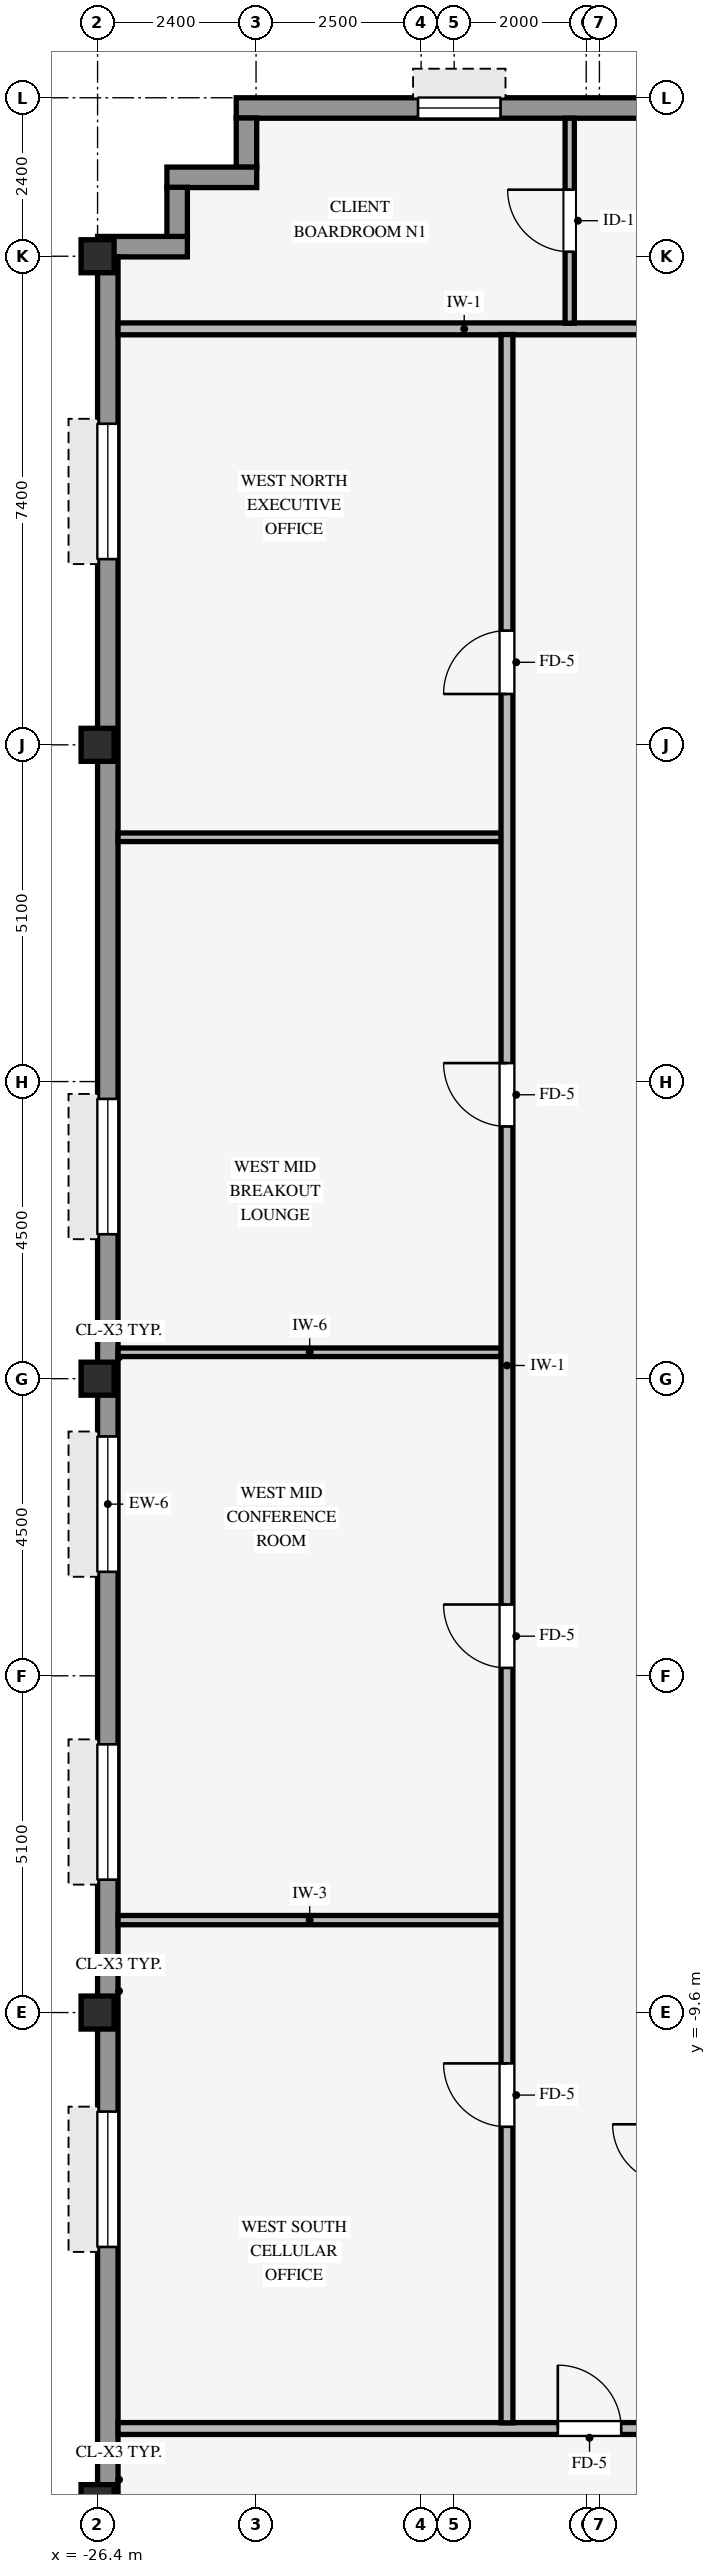
"""IFC4 building model, lengths in metres.
Left out: names, types, materials, properties, quantities, classifications, styles, units other than length and angle.
Written with IfcOpenShell. Run it as: python <this file> out.ifc"""

import sys

from ifc_helpers import new_model, si_unit, direction, frame, frame_2d, origin, origin_2d, place, context, subcontext, project, spatial, rectangle, hollow_rectangle, extrude, source, transform, mapped, element, fill, save


model = new_model("IFC4")
c1 = context("Model", 3, precision=1e-05, world=origin(), true_north=direction((0.0, 1.0)))
c2 = subcontext(c1, "Body", "Model", "MODEL_VIEW")
j1 = project(units=[si_unit("LENGTHUNIT", "METRE"), si_unit("PLANEANGLEUNIT", "RADIAN")], contexts=[c1])
p1 = place(None, origin())
s1 = spatial("IfcSite", under=j1, at=p1, CompositionType="ELEMENT")
p2 = place(p1, origin())
s2 = spatial("IfcBuilding", under=s1, at=p2, CompositionType="ELEMENT")
p3 = place(p2, frame((0.0, 0.0, 201.85)))
s3 = spatial("IfcBuildingStorey", under=s2, at=p3, CompositionType="ELEMENT", Elevation=201.85)
for number, where, z_axis, x_axis in (
    (1, (-26.4, -17.0, 0.0), (0.0, 0.0, 1.0), (1.0, 0.0, 0.0)),
    (2, (-26.4, -9.6, 0.0), (0.0, 0.0, 1.0), (1.0, 0.0, 0.0)),
    (3, (-26.4, 0.0, 0.0), (0.0, 0.0, 1.0), (1.0, 0.0, 0.0)),
    (4, (-26.4, 9.6, 0.0), (0.0, 0.0, 1.0), (1.0, 0.0, 0.0)),
    (5, (-26.4, 17.0, 0.0), (0.0, 0.0, 1.0), (1.0, 0.0, 0.0)),
):
    element("IfcColumn", number, at=place(p3, frame(where, z_axis=z_axis, x_axis=x_axis)), inside=s3, PredefinedType="COLUMN", context=c2, shape_type="SweptSolid", body=[
        extrude(hollow_rectangle(XDim=0.5, YDim=0.5, WallThickness=0.032, InnerFilletRadius=0.032, OuterFilletRadius=0.064, at=origin_2d()), origin(), (0.0, 0.0, 1.0), 3.37),
    ])
p4 = place(p3, frame((-24.3, 19.245, 0.0), z_axis=(0.0, 0.0, 1.0), x_axis=(1.0, 0.0, 0.0)))
e6 = element("IfcWall", 6, at=p4, inside=s3, PredefinedType="STANDARD", context=c2, shape_type="SweptSolid", body=[
    extrude(rectangle(XDim=44.8, YDim=0.31, at=frame_2d((22.4, 0.0))), origin(), (0.0, 0.0, 1.0), 2.705),
])
p5 = place(p4, frame((2.753, 0.0, 0.8)))
e7 = element("IfcOpeningElement", 7, at=p5, cuts=e6, PredefinedType="OPENING", context=c2, shape_type="SweptSolid", body=[
    extrude(rectangle(XDim=1.25, YDim=1.52, at=frame_2d((0.625, 0.76))), frame((0.0, 0.165, 0.0), z_axis=(0.0, -1.0, 0.0), x_axis=(1.0, 0.0, 0.0)), (0.0, 0.0, 1.0), 0.33),
])
p6 = place(p4, frame((7.508, 0.0, 0.8)))
e8 = element("IfcOpeningElement", 8, at=p6, cuts=e6, PredefinedType="OPENING", context=c2, shape_type="SweptSolid", body=[
    extrude(rectangle(XDim=1.25, YDim=1.52, at=frame_2d((0.625, 0.76))), frame((0.0, 0.165, 0.0), z_axis=(0.0, -1.0, 0.0), x_axis=(1.0, 0.0, 0.0)), (0.0, 0.0, 1.0), 0.33),
])
p7 = place(p4, frame((13.164, 0.0, 0.8)))
e9 = element("IfcOpeningElement", 9, at=p7, cuts=e6, PredefinedType="OPENING", context=c2, shape_type="SweptSolid", body=[
    extrude(rectangle(XDim=1.25, YDim=1.52, at=frame_2d((0.625, 0.76))), frame((0.0, 0.165, 0.0), z_axis=(0.0, -1.0, 0.0), x_axis=(1.0, 0.0, 0.0)), (0.0, 0.0, 1.0), 0.33),
])
p8 = place(p4, frame((17.019, 0.0, 0.8)))
e10 = element("IfcOpeningElement", 10, at=p8, cuts=e6, PredefinedType="OPENING", context=c2, shape_type="SweptSolid", body=[
    extrude(rectangle(XDim=1.25, YDim=1.52, at=frame_2d((0.625, 0.76))), frame((0.0, 0.165, 0.0), z_axis=(0.0, -1.0, 0.0), x_axis=(1.0, 0.0, 0.0)), (0.0, 0.0, 1.0), 0.33),
])
p9 = place(p4, frame((21.775, 0.0, 0.8)))
e11 = element("IfcOpeningElement", 11, at=p9, cuts=e6, PredefinedType="OPENING", context=c2, shape_type="SweptSolid", body=[
    extrude(rectangle(XDim=1.25, YDim=1.52, at=frame_2d((0.625, 0.76))), frame((0.0, 0.165, 0.0), z_axis=(0.0, -1.0, 0.0), x_axis=(1.0, 0.0, 0.0)), (0.0, 0.0, 1.0), 0.33),
])
p10 = place(p4, frame((26.531, 0.0, 0.8)))
e12 = element("IfcOpeningElement", 12, at=p10, cuts=e6, PredefinedType="OPENING", context=c2, shape_type="SweptSolid", body=[
    extrude(rectangle(XDim=1.25, YDim=1.52, at=frame_2d((0.625, 0.76))), frame((0.0, 0.165, 0.0), z_axis=(0.0, -1.0, 0.0), x_axis=(1.0, 0.0, 0.0)), (0.0, 0.0, 1.0), 0.33),
])
p11 = place(p4, frame((31.286, 0.0, 0.8)))
e13 = element("IfcOpeningElement", 13, at=p11, cuts=e6, PredefinedType="OPENING", context=c2, shape_type="SweptSolid", body=[
    extrude(rectangle(XDim=1.25, YDim=1.52, at=frame_2d((0.625, 0.76))), frame((0.0, 0.165, 0.0), z_axis=(0.0, -1.0, 0.0), x_axis=(1.0, 0.0, 0.0)), (0.0, 0.0, 1.0), 0.33),
])
p12 = place(p4, frame((36.492, 0.0, 0.8)))
e14 = element("IfcOpeningElement", 14, at=p12, cuts=e6, PredefinedType="OPENING", context=c2, shape_type="SweptSolid", body=[
    extrude(rectangle(XDim=1.25, YDim=1.52, at=frame_2d((0.625, 0.76))), frame((0.0, 0.165, 0.0), z_axis=(0.0, -1.0, 0.0), x_axis=(1.0, 0.0, 0.0)), (0.0, 0.0, 1.0), 0.33),
])
p13 = place(p4, frame((40.797, 0.0, 0.8)))
e15 = element("IfcOpeningElement", 15, at=p13, cuts=e6, PredefinedType="OPENING", context=c2, shape_type="SweptSolid", body=[
    extrude(rectangle(XDim=1.25, YDim=1.52, at=frame_2d((0.625, 0.76))), frame((0.0, 0.165, 0.0), z_axis=(0.0, -1.0, 0.0), x_axis=(1.0, 0.0, 0.0)), (0.0, 0.0, 1.0), 0.33),
])
p14 = place(p3, frame((-24.145, 18.346, 0.0), z_axis=(0.0, 0.0, 1.0), x_axis=(0.0, 1.0, 0.0)))
e16 = element("IfcWall", 16, at=p14, inside=s3, PredefinedType="STANDARD", context=c2, shape_type="SweptSolid", body=[
    extrude(rectangle(XDim=0.748, YDim=0.31, at=frame_2d((0.374, 0.0))), origin(), (0.0, 0.0, 1.0), 2.816),
])
p15 = place(p3, frame((-25.35, 18.195, 0.0), z_axis=(0.0, 0.0, 1.0), x_axis=(1.0, 0.0, 0.0)))
e17 = element("IfcWall", 17, at=p15, inside=s3, PredefinedType="STANDARD", context=c2, shape_type="SweptSolid", body=[
    extrude(rectangle(XDim=1.36, YDim=0.31, at=frame_2d((0.68, 0.0))), origin(), (0.0, 0.0, 1.0), 2.816),
])
p16 = place(p3, frame((-25.195, 17.296, 0.0), z_axis=(0.0, 0.0, 1.0), x_axis=(0.0, 1.0, 0.0)))
e18 = element("IfcWall", 18, at=p16, inside=s3, PredefinedType="STANDARD", context=c2, shape_type="SweptSolid", body=[
    extrude(rectangle(XDim=0.748, YDim=0.31, at=frame_2d((0.374, 0.0))), origin(), (0.0, 0.0, 1.0), 2.816),
])
p17 = place(p3, frame((-26.4, 17.145, 0.0), z_axis=(0.0, 0.0, 1.0), x_axis=(1.0, 0.0, 0.0)))
e19 = element("IfcWall", 19, at=p17, inside=s3, PredefinedType="STANDARD", context=c2, shape_type="SweptSolid", body=[
    extrude(rectangle(XDim=1.36, YDim=0.31, at=frame_2d((0.68, 0.0))), origin(), (0.0, 0.0, 1.0), 2.816),
])
p18 = place(p3, frame((-26.245, -20.794, 0.0), z_axis=(0.0, 0.0, 1.0), x_axis=(0.0, 1.0, 0.0)))
e20 = element("IfcWall", 20, at=p18, inside=s3, PredefinedType="STANDARD", context=c2, shape_type="SweptSolid", body=[
    extrude(rectangle(XDim=37.788, YDim=0.31, at=frame_2d((18.894, 0.0))), origin(), (0.0, 0.0, 1.0), 2.705),
])
p19 = place(p18, frame((7.644, 0.0, 0.8)))
e21 = element("IfcOpeningElement", 21, at=p19, cuts=e20, PredefinedType="OPENING", context=c2, shape_type="SweptSolid", body=[
    extrude(rectangle(XDim=2.05, YDim=1.52, at=frame_2d((1.025, 0.76))), frame((0.0, 0.165, 0.0), z_axis=(0.0, -1.0, 0.0), x_axis=(1.0, 0.0, 0.0)), (0.0, 0.0, 1.0), 0.33),
])
p20 = place(p18, frame((13.206, 0.0, 0.8)))
e22 = element("IfcOpeningElement", 22, at=p20, cuts=e20, PredefinedType="OPENING", context=c2, shape_type="SweptSolid", body=[
    extrude(rectangle(XDim=2.05, YDim=1.52, at=frame_2d((1.025, 0.76))), frame((0.0, 0.165, 0.0), z_axis=(0.0, -1.0, 0.0), x_axis=(1.0, 0.0, 0.0)), (0.0, 0.0, 1.0), 0.33),
])
p21 = place(p18, frame((17.869, 0.0, 0.8)))
e23 = element("IfcOpeningElement", 23, at=p21, cuts=e20, PredefinedType="OPENING", context=c2, shape_type="SweptSolid", body=[
    extrude(rectangle(XDim=2.05, YDim=1.52, at=frame_2d((1.025, 0.76))), frame((0.0, 0.165, 0.0), z_axis=(0.0, -1.0, 0.0), x_axis=(1.0, 0.0, 0.0)), (0.0, 0.0, 1.0), 0.33),
])
p22 = place(p18, frame((22.982, 0.0, 0.8)))
e24 = element("IfcOpeningElement", 24, at=p22, cuts=e20, PredefinedType="OPENING", context=c2, shape_type="SweptSolid", body=[
    extrude(rectangle(XDim=2.05, YDim=1.52, at=frame_2d((1.025, 0.76))), frame((0.0, 0.165, 0.0), z_axis=(0.0, -1.0, 0.0), x_axis=(1.0, 0.0, 0.0)), (0.0, 0.0, 1.0), 0.33),
])
p23 = place(p18, frame((33.207, 0.0, 0.8)))
e25 = element("IfcOpeningElement", 25, at=p23, cuts=e20, PredefinedType="OPENING", context=c2, shape_type="SweptSolid", body=[
    extrude(rectangle(XDim=2.05, YDim=1.52, at=frame_2d((1.025, 0.76))), frame((0.0, 0.165, 0.0), z_axis=(0.0, -1.0, 0.0), x_axis=(1.0, 0.0, 0.0)), (0.0, 0.0, 1.0), 0.33),
])
p24 = place(p3, frame((-26.09, -15.9, 0.0), z_axis=(0.0, 0.0, 1.0), x_axis=(1.0, 0.0, 0.0)))
e26 = element("IfcWall", 26, at=p24, inside=s3, PredefinedType="PARTITIONING", context=c2, shape_type="SweptSolid", body=[
    extrude(rectangle(XDim=48.38, YDim=0.18, at=frame_2d((24.19, 0.0))), origin(), (0.0, 0.0, 1.0), 3.36),
])
p25 = place(p24, frame((15.56, 0.0, 0.0)))
e27 = element("IfcOpeningElement", 27, at=p25, cuts=e26, PredefinedType="OPENING", context=c2, shape_type="SweptSolid", body=[
    extrude(rectangle(XDim=0.96, YDim=2.1, at=frame_2d((0.48, 1.05))), frame((0.0, 0.1, 0.0), z_axis=(0.0, -1.0, 0.0), x_axis=(1.0, 0.0, 0.0)), (0.0, 0.0, 1.0), 0.2),
])
p26 = place(p24, frame((40.51, 0.0, 0.0)))
e28 = element("IfcOpeningElement", 28, at=p26, cuts=e26, PredefinedType="OPENING", context=c2, shape_type="SweptSolid", body=[
    extrude(rectangle(XDim=0.96, YDim=2.1, at=frame_2d((0.48, 1.05))), frame((0.0, 0.1, 0.0), z_axis=(0.0, -1.0, 0.0), x_axis=(1.0, 0.0, 0.0)), (0.0, 0.0, 1.0), 0.2),
])
p27 = place(p24, frame((6.66, 0.0, 0.0)))
e29 = element("IfcOpeningElement", 29, at=p27, cuts=e26, PredefinedType="OPENING", context=c2, shape_type="SweptSolid", body=[
    extrude(rectangle(XDim=0.96, YDim=2.1, at=frame_2d((0.48, 1.05))), frame((0.0, 0.1, 0.0), z_axis=(0.0, -1.0, 0.0), x_axis=(1.0, 0.0, 0.0)), (0.0, 0.0, 1.0), 0.2),
])
p28 = place(p3, frame((-26.09, -8.2, 0.0), z_axis=(0.0, 0.0, 1.0), x_axis=(1.0, 0.0, 0.0)))
e30 = element("IfcWall", 30, at=p28, inside=s3, PredefinedType="PARTITIONING", context=c2, shape_type="SweptSolid", body=[
    extrude(rectangle(XDim=5.804, YDim=0.14, at=frame_2d((2.902, 0.0))), origin(), (0.0, 0.0, 1.0), 3.36),
])
p29 = place(p3, frame((-26.09, 0.4, 0.0), z_axis=(0.0, 0.0, 1.0), x_axis=(1.0, 0.0, 0.0)))
e31 = element("IfcWall", 31, at=p29, inside=s3, PredefinedType="PARTITIONING", context=c2, shape_type="SweptSolid", body=[
    extrude(rectangle(XDim=5.804, YDim=0.13, at=frame_2d((2.902, 0.0))), origin(), (0.0, 0.0, 1.0), 2.816),
])
p30 = place(p3, frame((-26.09, 8.2, 0.0), z_axis=(0.0, 0.0, 1.0), x_axis=(1.0, 0.0, 0.0)))
e32 = element("IfcWall", 32, at=p30, inside=s3, PredefinedType="PARTITIONING", context=c2, shape_type="SweptSolid", body=[
    extrude(rectangle(XDim=5.804, YDim=0.13, at=frame_2d((2.902, 0.0))), origin(), (0.0, 0.0, 1.0), 3.36),
])
p31 = place(p3, frame((-26.09, 15.9, 0.0), z_axis=(0.0, 0.0, 1.0), x_axis=(1.0, 0.0, 0.0)))
e33 = element("IfcWall", 33, at=p31, inside=s3, PredefinedType="PARTITIONING", context=c2, shape_type="SweptSolid", body=[
    extrude(rectangle(XDim=48.38, YDim=0.18, at=frame_2d((24.19, 0.0))), origin(), (0.0, 0.0, 1.0), 3.36),
])
p32 = place(p31, frame((41.81, 0.0, 0.0)))
e34 = element("IfcOpeningElement", 34, at=p32, cuts=e33, PredefinedType="OPENING", context=c2, shape_type="SweptSolid", body=[
    extrude(rectangle(XDim=0.96, YDim=2.1, at=frame_2d((0.48, 1.05))), frame((0.0, 0.1, 0.0), z_axis=(0.0, -1.0, 0.0), x_axis=(1.0, 0.0, 0.0)), (0.0, 0.0, 1.0), 0.2),
])
p33 = place(p31, frame((17.985, 0.0, 0.0)))
e35 = element("IfcOpeningElement", 35, at=p33, cuts=e33, PredefinedType="OPENING", context=c2, shape_type="SweptSolid", body=[
    extrude(rectangle(XDim=0.96, YDim=2.1, at=frame_2d((0.48, 1.05))), frame((0.0, 0.1, 0.0), z_axis=(0.0, -1.0, 0.0), x_axis=(1.0, 0.0, 0.0)), (0.0, 0.0, 1.0), 0.2),
])
p34 = place(p31, frame((26.55, 0.0, 0.0)))
e36 = element("IfcOpeningElement", 36, at=p34, cuts=e33, PredefinedType="OPENING", context=c2, shape_type="SweptSolid", body=[
    extrude(rectangle(XDim=0.96, YDim=2.1, at=frame_2d((0.48, 1.05))), frame((0.0, 0.1, 0.0), z_axis=(0.0, -1.0, 0.0), x_axis=(1.0, 0.0, 0.0)), (0.0, 0.0, 1.0), 0.2),
])
p35 = place(p31, frame((10.935, 0.0, 0.0)))
e37 = element("IfcOpeningElement", 37, at=p35, cuts=e33, PredefinedType="OPENING", context=c2, shape_type="SweptSolid", body=[
    extrude(rectangle(XDim=0.96, YDim=2.1, at=frame_2d((0.48, 1.05))), frame((0.0, 0.1, 0.0), z_axis=(0.0, -1.0, 0.0), x_axis=(1.0, 0.0, 0.0)), (0.0, 0.0, 1.0), 0.2),
])
p36 = place(p31, frame((35.91, 0.0, 0.0)))
e38 = element("IfcOpeningElement", 38, at=p36, cuts=e33, PredefinedType="OPENING", context=c2, shape_type="SweptSolid", body=[
    extrude(rectangle(XDim=0.96, YDim=2.1, at=frame_2d((0.48, 1.05))), frame((0.0, 0.1, 0.0), z_axis=(0.0, -1.0, 0.0), x_axis=(1.0, 0.0, 0.0)), (0.0, 0.0, 1.0), 0.2),
])
p37 = place(p3, frame((-20.2, -15.814, 0.0), z_axis=(0.0, 0.0, 1.0), x_axis=(0.0, 1.0, 0.0)))
e39 = element("IfcWall", 39, at=p37, inside=s3, PredefinedType="PARTITIONING", context=c2, shape_type="SweptSolid", body=[
    extrude(rectangle(XDim=31.628, YDim=0.18, at=frame_2d((15.814, 0.0))), origin(), (0.0, 0.0, 1.0), 3.36),
])
p38 = place(p37, frame((11.434, 0.0, 0.0)))
e40 = element("IfcOpeningElement", 40, at=p38, cuts=e39, PredefinedType="OPENING", context=c2, shape_type="SweptSolid", body=[
    extrude(rectangle(XDim=0.96, YDim=2.1, at=frame_2d((0.48, 1.05))), frame((0.0, 0.1, 0.0), z_axis=(0.0, -1.0, 0.0), x_axis=(1.0, 0.0, 0.0)), (0.0, 0.0, 1.0), 0.2),
])
p39 = place(p37, frame((19.634, 0.0, 0.0)))
e41 = element("IfcOpeningElement", 41, at=p39, cuts=e39, PredefinedType="OPENING", context=c2, shape_type="SweptSolid", body=[
    extrude(rectangle(XDim=0.96, YDim=2.1, at=frame_2d((0.48, 1.05))), frame((0.0, 0.1, 0.0), z_axis=(0.0, -1.0, 0.0), x_axis=(1.0, 0.0, 0.0)), (0.0, 0.0, 1.0), 0.2),
])
p40 = place(p37, frame((4.484, 0.0, 0.0)))
e42 = element("IfcOpeningElement", 42, at=p40, cuts=e39, PredefinedType="OPENING", context=c2, shape_type="SweptSolid", body=[
    extrude(rectangle(XDim=0.96, YDim=2.1, at=frame_2d((0.48, 1.05))), frame((0.0, 0.1, 0.0), z_axis=(0.0, -1.0, 0.0), x_axis=(1.0, 0.0, 0.0)), (0.0, 0.0, 1.0), 0.2),
])
p41 = place(p37, frame((26.184, 0.0, 0.0)))
e43 = element("IfcOpeningElement", 43, at=p41, cuts=e39, PredefinedType="OPENING", context=c2, shape_type="SweptSolid", body=[
    extrude(rectangle(XDim=0.96, YDim=2.1, at=frame_2d((0.48, 1.05))), frame((0.0, 0.1, 0.0), z_axis=(0.0, -1.0, 0.0), x_axis=(1.0, 0.0, 0.0)), (0.0, 0.0, 1.0), 0.2),
])
p42 = place(p3, frame((-19.25, 15.986, 0.0), z_axis=(0.0, 0.0, 1.0), x_axis=(0.0, 1.0, 0.0)))
e44 = element("IfcWall", 44, at=p42, inside=s3, PredefinedType="PARTITIONING", context=c2, shape_type="SweptSolid", body=[
    extrude(rectangle(XDim=3.104, YDim=0.14, at=frame_2d((1.552, 0.0))), origin(), (0.0, 0.0, 1.0), 3.36),
])
p43 = place(p42, frame((1.082, 0.0, 0.0)))
e45 = element("IfcOpeningElement", 45, at=p43, cuts=e44, PredefinedType="OPENING", context=c2, shape_type="SweptSolid", body=[
    extrude(rectangle(XDim=0.94, YDim=2.1, at=frame_2d((0.47, 1.05))), frame((0.0, 0.08, 0.0), z_axis=(0.0, -1.0, 0.0), x_axis=(1.0, 0.0, 0.0)), (0.0, 0.0, 1.0), 0.16),
])
m1 = source(origin(), c2, "Body", "SweptSolid", [
    extrude(rectangle(XDim=1.25, YDim=1.52, at=frame_2d((0.625, 0.76))), frame((0.0, 0.03, 0.0), z_axis=(0.0, -1.0, 0.0), x_axis=(1.0, 0.0, 0.0)), (0.0, 0.0, 1.0), 0.06),
])
p44 = place(p5, origin())
e46 = element("IfcWindow", 46, at=p44, inside=s3, PartitioningType="SINGLE_PANEL", PredefinedType="WINDOW", context=c2, shape_type="MappedRepresentation", body=[
    mapped(m1, transform((0.0, 0.0, 0.0), scale=1.0)),
])
fill(e7, e46)
m2 = source(origin(), c2, "Body", "SweptSolid", [
    extrude(rectangle(XDim=2.05, YDim=1.52, at=frame_2d((1.025, 0.76))), frame((0.0, 0.03, 0.0), z_axis=(0.0, -1.0, 0.0), x_axis=(1.0, 0.0, 0.0)), (0.0, 0.0, 1.0), 0.06),
])
p45 = place(p19, origin())
e47 = element("IfcWindow", 47, at=p45, inside=s3, PartitioningType="SINGLE_PANEL", PredefinedType="WINDOW", context=c2, shape_type="MappedRepresentation", body=[
    mapped(m2, transform((0.0, 0.0, 0.0), scale=1.0)),
])
fill(e21, e47)
p46 = place(p20, origin())
e48 = element("IfcWindow", 48, at=p46, inside=s3, PartitioningType="SINGLE_PANEL", PredefinedType="WINDOW", context=c2, shape_type="MappedRepresentation", body=[
    mapped(m2, transform((0.0, 0.0, 0.0), scale=1.0)),
])
fill(e22, e48)
p47 = place(p21, origin())
e49 = element("IfcWindow", 49, at=p47, inside=s3, PartitioningType="SINGLE_PANEL", PredefinedType="WINDOW", context=c2, shape_type="MappedRepresentation", body=[
    mapped(m2, transform((0.0, 0.0, 0.0), scale=1.0)),
])
fill(e23, e49)
p48 = place(p22, origin())
e50 = element("IfcWindow", 50, at=p48, inside=s3, PartitioningType="SINGLE_PANEL", PredefinedType="WINDOW", context=c2, shape_type="MappedRepresentation", body=[
    mapped(m2, transform((0.0, 0.0, 0.0), scale=1.0)),
])
fill(e24, e50)
p49 = place(p23, origin())
e51 = element("IfcWindow", 51, at=p49, inside=s3, PartitioningType="SINGLE_PANEL", PredefinedType="WINDOW", context=c2, shape_type="MappedRepresentation", body=[
    mapped(m2, transform((0.0, 0.0, 0.0), scale=1.0)),
])
fill(e25, e51)
m3 = source(origin(), c2, "Body", "SweptSolid", [
    extrude(rectangle(XDim=0.96, YDim=2.1, at=frame_2d((0.48, 1.05))), frame((0.0, 0.025, 0.0), z_axis=(0.0, -1.0, 0.0), x_axis=(1.0, 0.0, 0.0)), (0.0, 0.0, 1.0), 0.05),
])
p50 = place(p38, origin())
e52 = element("IfcDoor", 52, at=p50, inside=s3, OperationType="SINGLE_SWING_RIGHT", PredefinedType="DOOR", context=c2, shape_type="MappedRepresentation", body=[
    mapped(m3, transform((0.0, 0.0, 0.0), scale=1.0)),
])
fill(e40, e52)
p51 = place(p39, origin())
e53 = element("IfcDoor", 53, at=p51, inside=s3, OperationType="SINGLE_SWING_RIGHT", PredefinedType="DOOR", context=c2, shape_type="MappedRepresentation", body=[
    mapped(m3, transform((0.0, 0.0, 0.0), scale=1.0)),
])
fill(e41, e53)
p52 = place(p40, origin())
e54 = element("IfcDoor", 54, at=p52, inside=s3, OperationType="SINGLE_SWING_RIGHT", PredefinedType="DOOR", context=c2, shape_type="MappedRepresentation", body=[
    mapped(m3, transform((0.0, 0.0, 0.0), scale=1.0)),
])
fill(e42, e54)
p53 = place(p41, origin())
e55 = element("IfcDoor", 55, at=p53, inside=s3, OperationType="SINGLE_SWING_LEFT", PredefinedType="DOOR", context=c2, shape_type="MappedRepresentation", body=[
    mapped(m3, transform((0.0, 0.0, 0.0), scale=1.0)),
])
fill(e43, e55)
p54 = place(p27, origin())
e56 = element("IfcDoor", 56, at=p54, inside=s3, OperationType="SINGLE_SWING_LEFT", PredefinedType="DOOR", context=c2, shape_type="MappedRepresentation", body=[
    mapped(m3, transform((0.0, 0.0, 0.0), scale=1.0)),
])
fill(e29, e56)
m4 = source(origin(), c2, "Body", "SweptSolid", [
    extrude(rectangle(XDim=0.94, YDim=2.1, at=frame_2d((0.47, 1.05))), frame((0.0, 0.025, 0.0), z_axis=(0.0, -1.0, 0.0), x_axis=(1.0, 0.0, 0.0)), (0.0, 0.0, 1.0), 0.05),
])
p55 = place(p43, origin())
e57 = element("IfcDoor", 57, at=p55, inside=s3, OperationType="SINGLE_SWING_RIGHT", PredefinedType="DOOR", context=c2, shape_type="MappedRepresentation", body=[
    mapped(m4, transform((0.0, 0.0, 0.0), scale=1.0)),
])
fill(e45, e57)
save(model, sys.argv[1])
